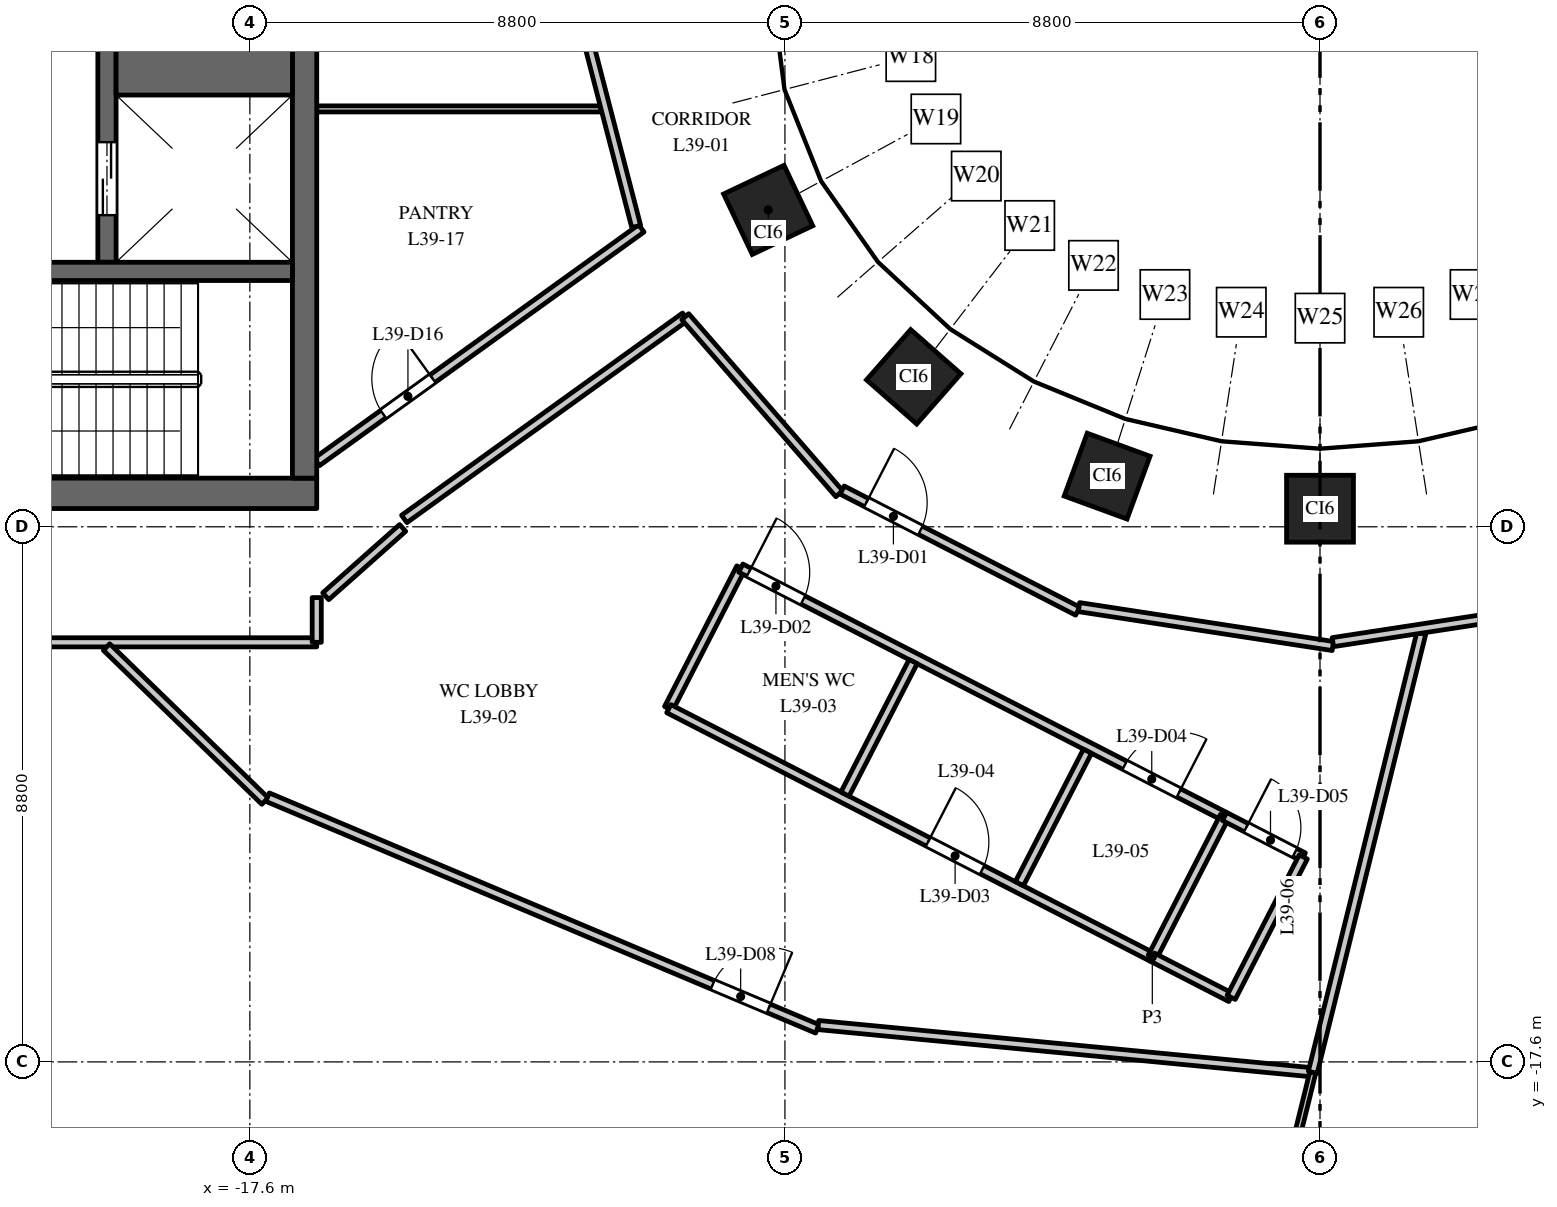
"""IFC4 building model, lengths in metres.
Left out: names, types, materials, properties, quantities, classifications, styles, units other than length and angle.
Written with IfcOpenShell. Run it as: python <this file> out.ifc"""

import sys

from ifc_helpers import new_model, si_unit, direction, frame, frame_2d, origin, origin_2d, place, context, subcontext, project, spatial, rectangle, extrude, element, fill, save


model = new_model("IFC4")
c1 = context("Model", 3, precision=1e-05, world=origin(), true_north=direction((0.0, 1.0)))
c2 = subcontext(c1, "Body", "Model", "MODEL_VIEW")
j1 = project(units=[si_unit("LENGTHUNIT", "METRE"), si_unit("PLANEANGLEUNIT", "RADIAN")], contexts=[c1])
p1 = place(None, origin())
s1 = spatial("IfcSite", under=j1, at=p1, CompositionType="ELEMENT")
p2 = place(p1, origin())
s2 = spatial("IfcBuilding", under=s1, at=p2, CompositionType="ELEMENT")
p3 = place(p2, frame((0.0, 0.0, 170.0)))
s3 = spatial("IfcBuildingStorey", under=s2, at=p3, CompositionType="ELEMENT", Elevation=170.0)
for number, where, z_axis, x_axis in (
    (1, (-9.076, -3.588, 0.0), (0.0, 0.0, 1.0), (0.429, -0.903, 0.0)),
    (2, (-6.682, -6.334, 0.0), (0.0, 0.0, 1.0), (0.751, -0.66, 0.0)),
    (3, (-3.501, -7.967, 0.0), (0.0, 0.0, 1.0), (0.939, -0.344, 0.0)),
    (4, (0.0, -8.503, 0.0), (0.0, 0.0, 1.0), (1.0, 0.0, 0.0)),
):
    element("IfcColumn", number, at=place(p3, frame(where, z_axis=z_axis, x_axis=x_axis)), inside=s3, PredefinedType="COLUMN", context=c2, shape_type="SweptSolid", body=[
        extrude(rectangle(XDim=1.1, YDim=1.1, at=origin_2d()), origin(), (0.0, 0.0, 1.0), 4.0),
    ])
p4 = place(p3, frame((-16.5, -8.25, 0.0), z_axis=(0.0, 0.0, 1.0), x_axis=(-1.0, 0.0, 0.0)))
e5 = element("IfcWall", 5, at=p4, inside=s3, PredefinedType="SHEAR", context=c2, shape_type="SweptSolid", body=[
    extrude(rectangle(XDim=15.0, YDim=0.5, at=frame_2d((7.5, 0.0))), origin(), (0.0, 0.0, 1.0), 3.7),
])
p5 = place(p4, frame((6.9, 0.0, 0.0)))
e6 = element("IfcOpeningElement", 6, at=p5, cuts=e5, PredefinedType="OPENING", context=c2, shape_type="SweptSolid", body=[
    extrude(rectangle(XDim=1.2, YDim=2.1, at=frame_2d((0.6, 1.05))), frame((0.0, 0.26, 0.0), z_axis=(0.0, -1.0, 0.0), x_axis=(1.0, 0.0, 0.0)), (0.0, 0.0, 1.0), 0.52),
])
p6 = place(p4, frame((12.05, 0.0, 0.0)))
e7 = element("IfcOpeningElement", 7, at=p6, cuts=e5, PredefinedType="OPENING", context=c2, shape_type="SweptSolid", body=[
    extrude(rectangle(XDim=0.9, YDim=2.1, at=frame_2d((0.45, 1.05))), frame((0.0, 0.26, 0.0), z_axis=(0.0, -1.0, 0.0), x_axis=(1.0, 0.0, 0.0)), (0.0, 0.0, 1.0), 0.52),
])
p7 = place(p3, frame((-19.95, -4.45, 0.0), z_axis=(0.0, 0.0, 1.0), x_axis=(0.0, 1.0, 0.0)))
e8 = element("IfcWall", 8, at=p7, inside=s3, PredefinedType="SHEAR", context=c2, shape_type="SweptSolid", body=[
    extrude(rectangle(XDim=8.9, YDim=0.3, at=frame_2d((4.45, 0.0))), origin(), (0.0, 0.0, 1.0), 3.7),
])
p8 = place(p7, frame((0.775, 0.0, 0.0)))
e9 = element("IfcOpeningElement", 9, at=p8, cuts=e8, PredefinedType="OPENING", context=c2, shape_type="SweptSolid", body=[
    extrude(rectangle(XDim=1.2, YDim=2.1, at=frame_2d((0.6, 1.05))), frame((0.0, 0.16, 0.0), z_axis=(0.0, -1.0, 0.0), x_axis=(1.0, 0.0, 0.0)), (0.0, 0.0, 1.0), 0.32),
])
p9 = place(p7, frame((7.25, 0.0, 0.0)))
e10 = element("IfcOpeningElement", 10, at=p9, cuts=e8, PredefinedType="OPENING", context=c2, shape_type="SweptSolid", body=[
    extrude(rectangle(XDim=1.1, YDim=2.1, at=frame_2d((0.55, 1.05))), frame((0.0, 0.16, 0.0), z_axis=(0.0, -1.0, 0.0), x_axis=(1.0, 0.0, 0.0)), (0.0, 0.0, 1.0), 0.32),
])
p10 = place(p3, frame((-16.7, -8.0, 0.0), z_axis=(0.0, 0.0, 1.0), x_axis=(0.0, 1.0, 0.0)))
e11 = element("IfcWall", 11, at=p10, inside=s3, PredefinedType="SHEAR", context=c2, shape_type="SweptSolid", body=[
    extrude(rectangle(XDim=16.0, YDim=0.4, at=frame_2d((8.0, 0.0))), origin(), (0.0, 0.0, 1.0), 3.7),
])
p11 = place(p3, frame((-16.9, -1.075, 0.0), z_axis=(0.0, 0.0, 1.0), x_axis=(-1.0, 0.0, 0.0)))
e12 = element("IfcWall", 12, at=p11, inside=s3, PredefinedType="SHEAR", context=c2, shape_type="SweptSolid", body=[
    extrude(rectangle(XDim=2.9, YDim=1.25, at=frame_2d((1.45, 0.0))), origin(), (0.0, 0.0, 1.0), 3.7),
])
p12 = place(p3, frame((-16.9, -4.6, 0.0), z_axis=(0.0, 0.0, 1.0), x_axis=(-1.0, 0.0, 0.0)))
e13 = element("IfcWall", 13, at=p12, inside=s3, PredefinedType="SHEAR", context=c2, shape_type="SweptSolid", body=[
    extrude(rectangle(XDim=6.18, YDim=0.3, at=frame_2d((3.09, 0.0))), origin(), (0.0, 0.0, 1.0), 3.7),
])
p13 = place(p12, frame((4.9, 0.0, 0.0)))
e14 = element("IfcOpeningElement", 14, at=p13, cuts=e13, PredefinedType="OPENING", context=c2, shape_type="SweptSolid", body=[
    extrude(rectangle(XDim=1.1, YDim=2.1, at=frame_2d((0.55, 1.05))), frame((0.0, 0.16, 0.0), z_axis=(0.0, -1.0, 0.0), x_axis=(1.0, 0.0, 0.0)), (0.0, 0.0, 1.0), 0.32),
])
p14 = place(p3, frame((-31.5, -10.7, 0.0), z_axis=(0.0, 0.0, 1.0), x_axis=(1.0, 0.0, 0.0)))
e15 = element("IfcWall", 15, at=p14, inside=s3, PredefinedType="PARTITIONING", context=c2, shape_type="SweptSolid", body=[
    extrude(rectangle(XDim=15.0, YDim=0.15, at=frame_2d((7.5, 0.0))), origin(), (0.0, 0.0, 1.0), 3.1),
])
p15 = place(p14, frame((5.15, 0.0, 0.0)))
e16 = element("IfcOpeningElement", 16, at=p15, cuts=e15, PredefinedType="OPENING", context=c2, shape_type="SweptSolid", body=[
    extrude(rectangle(XDim=1.0, YDim=2.1, at=frame_2d((0.5, 1.05))), frame((0.0, 0.085, 0.0), z_axis=(0.0, -1.0, 0.0), x_axis=(1.0, 0.0, 0.0)), (0.0, 0.0, 1.0), 0.17),
])
p16 = place(p3, frame((-19.957, -10.778, 0.0), z_axis=(0.0, 0.0, 1.0), x_axis=(0.717213172792, -0.696853833148, 0.0)))
e17 = element("IfcWall", 17, at=p16, inside=s3, PredefinedType="PARTITIONING", context=c2, shape_type="SweptSolid", body=[
    extrude(rectangle(XDim=3.634, YDim=0.15, at=frame_2d((1.817, 0.0))), origin(), (0.0, 0.0, 1.0), 2.75),
])
p17 = place(p3, frame((-17.309, -13.246, 0.0), z_axis=(0.0, 0.0, 1.0), x_axis=(0.92150277738, -0.388371769417, 0.0)))
e18 = element("IfcWall", 18, at=p17, inside=s3, PredefinedType="PARTITIONING", context=c2, shape_type="SweptSolid", body=[
    extrude(rectangle(XDim=9.812, YDim=0.15, at=frame_2d((4.906, 0.0))), origin(), (0.0, 0.0, 1.0), 2.85),
])
p18 = place(p17, frame((7.944, 0.0, 0.0)))
e19 = element("IfcOpeningElement", 19, at=p18, cuts=e18, PredefinedType="OPENING", context=c2, shape_type="SweptSolid", body=[
    extrude(rectangle(XDim=1.0, YDim=2.1, at=frame_2d((0.5, 1.05))), frame((0.0, 0.085, 0.0), z_axis=(0.0, -1.0, 0.0), x_axis=(1.0, 0.0, 0.0)), (0.0, 0.0, 1.0), 0.17),
])
p19 = place(p3, frame((-16.5, -10.7, 0.0), z_axis=(0.0, 0.0, 1.0), x_axis=(0.0, 1.0, 0.0)))
e20 = element("IfcWall", 20, at=p19, inside=s3, PredefinedType="PARTITIONING", context=c2, shape_type="SweptSolid", body=[
    extrude(rectangle(XDim=0.736, YDim=0.15, at=frame_2d((0.368, 0.0))), origin(), (0.0, 0.0, 1.0), 3.7),
])
p20 = place(p3, frame((-16.5, -1.928, 0.0), z_axis=(0.0, 0.0, 1.0), x_axis=(1.0, 0.0, 0.0)))
e21 = element("IfcWall", 21, at=p20, inside=s3, PredefinedType="PARTITIONING", context=c2, shape_type="SweptSolid", body=[
    extrude(rectangle(XDim=4.672, YDim=0.1, at=frame_2d((2.336, 0.0))), origin(), (0.0, 0.0, 1.0), 3.7),
])
p21 = place(p3, frame((-16.5, -7.735, 0.0), z_axis=(0.0, 0.0, 1.0), x_axis=(0.811616692984, 0.584190331715, 0.0)))
e22 = element("IfcWall", 22, at=p21, inside=s3, PredefinedType="PARTITIONING", context=c2, shape_type="SweptSolid", body=[
    extrude(rectangle(XDim=6.578, YDim=0.15, at=frame_2d((3.289, 0.0))), origin(), (0.0, 0.0, 1.0), 3.7),
])
p22 = place(p21, frame((1.348, 0.0, 0.0)))
e23 = element("IfcOpeningElement", 23, at=p22, cuts=e22, PredefinedType="OPENING", context=c2, shape_type="SweptSolid", body=[
    extrude(rectangle(XDim=1.0, YDim=2.1, at=frame_2d((0.5, 1.05))), frame((0.0, 0.085, 0.0), z_axis=(0.0, -1.0, 0.0), x_axis=(1.0, 0.0, 0.0)), (0.0, 0.0, 1.0), 0.17),
])
p23 = place(p3, frame((-15.061, -8.671, 0.0), z_axis=(0.0, 0.0, 1.0), x_axis=(0.811697765448, 0.584077681106, 0.0)))
e24 = element("IfcWall", 24, at=p23, inside=s3, PredefinedType="PARTITIONING", context=c2, shape_type="SweptSolid", body=[
    extrude(rectangle(XDim=5.694, YDim=0.15, at=frame_2d((2.847, 0.0))), origin(), (0.0, 0.0, 1.0), 3.7),
])
p24 = place(p3, frame((-12.286, 0.149, 0.0), z_axis=(0.0, 0.0, 1.0), x_axis=(0.250998973278, -0.96798735292, 0.0)))
e25 = element("IfcWall", 25, at=p24, inside=s3, PredefinedType="PARTITIONING", context=c2, shape_type="SweptSolid", body=[
    extrude(rectangle(XDim=4.143, YDim=0.15, at=frame_2d((2.071, 0.0))), origin(), (0.0, 0.0, 1.0), 3.7),
])
p25 = place(p3, frame((-10.713, -11.789, 0.0), z_axis=(0.0, 0.0, 1.0), x_axis=(0.457029651421, 0.88945145889, 0.0)))
e26 = element("IfcWall", 26, at=p25, inside=s3, PredefinedType="PARTITIONING", context=c2, shape_type="SweptSolid", body=[
    extrude(rectangle(XDim=2.599, YDim=0.15, at=frame_2d((1.3, 0.0))), origin(), (0.0, 0.0, 1.0), 3.7),
])
p26 = place(p3, frame((-10.71, -11.791, 0.0), z_axis=(0.0, 0.0, 1.0), x_axis=(0.889407716884, -0.457114770214, 0.0)))
e27 = element("IfcWall", 27, at=p26, inside=s3, PredefinedType="PARTITIONING", context=c2, shape_type="SweptSolid", body=[
    extrude(rectangle(XDim=8.941, YDim=0.15, at=frame_2d((4.47, 0.0))), origin(), (0.0, 0.0, 1.0), 2.85),
])
p27 = place(p26, frame((4.794, 0.0, 0.0)))
e28 = element("IfcOpeningElement", 28, at=p27, cuts=e27, PredefinedType="OPENING", context=c2, shape_type="SweptSolid", body=[
    extrude(rectangle(XDim=1.0, YDim=2.1, at=frame_2d((0.5, 1.05))), frame((0.0, 0.085, 0.0), z_axis=(0.0, -1.0, 0.0), x_axis=(1.0, 0.0, 0.0)), (0.0, 0.0, 1.0), 0.17),
])
p28 = place(p3, frame((-10.439, -5.345, 0.0), z_axis=(0.0, 0.0, 1.0), x_axis=(0.656405809938, -0.754407988213, 0.0)))
e29 = element("IfcWall", 29, at=p28, inside=s3, PredefinedType="PARTITIONING", context=c2, shape_type="SweptSolid", body=[
    extrude(rectangle(XDim=3.859, YDim=0.15, at=frame_2d((1.929, 0.0))), origin(), (0.0, 0.0, 1.0), 2.75),
])
p29 = place(p3, frame((-9.526, -9.479, 0.0), z_axis=(0.0, 0.0, 1.0), x_axis=(0.889587704396, -0.456764398992, 0.0)))
e30 = element("IfcWall", 30, at=p29, inside=s3, PredefinedType="PARTITIONING", context=c2, shape_type="SweptSolid", body=[
    extrude(rectangle(XDim=8.943, YDim=0.15, at=frame_2d((4.472, 0.0))), origin(), (0.0, 0.0, 1.0), 2.85),
])
p30 = place(p29, frame((0.15, 0.0, 0.0)))
e31 = element("IfcOpeningElement", 31, at=p30, cuts=e30, PredefinedType="OPENING", context=c2, shape_type="SweptSolid", body=[
    extrude(rectangle(XDim=1.0, YDim=2.1, at=frame_2d((0.5, 1.05))), frame((0.0, 0.085, 0.0), z_axis=(0.0, -1.0, 0.0), x_axis=(1.0, 0.0, 0.0)), (0.0, 0.0, 1.0), 0.17),
])
p31 = place(p29, frame((7.098, 0.0, 0.0)))
e32 = element("IfcOpeningElement", 32, at=p31, cuts=e30, PredefinedType="OPENING", context=c2, shape_type="SweptSolid", body=[
    extrude(rectangle(XDim=1.0, YDim=2.1, at=frame_2d((0.5, 1.05))), frame((0.0, 0.085, 0.0), z_axis=(0.0, -1.0, 0.0), x_axis=(1.0, 0.0, 0.0)), (0.0, 0.0, 1.0), 0.17),
])
p32 = place(p3, frame((-8.251, -16.994, 0.0), z_axis=(0.0, 0.0, 1.0), x_axis=(0.995454957633, -0.095233540959, 0.0)))
e33 = element("IfcWall", 33, at=p32, inside=s3, PredefinedType="PARTITIONING", context=c2, shape_type="SweptSolid", body=[
    extrude(rectangle(XDim=8.17, YDim=0.15, at=frame_2d((4.085, 0.0))), origin(), (0.0, 0.0, 1.0), 2.85),
])
p33 = place(p3, frame((-7.859, -8.196, 0.0), z_axis=(0.0, 0.0, 1.0), x_axis=(0.889405670308, -0.457118752213, 0.0)))
e34 = element("IfcWall", 34, at=p33, inside=s3, PredefinedType="PARTITIONING", context=c2, shape_type="SweptSolid", body=[
    extrude(rectangle(XDim=4.355, YDim=0.15, at=frame_2d((2.178, 0.0))), origin(), (0.0, 0.0, 1.0), 2.85),
])
p34 = place(p33, frame((0.448, 0.0, 0.0)))
e35 = element("IfcOpeningElement", 35, at=p34, cuts=e34, PredefinedType="OPENING", context=c2, shape_type="SweptSolid", body=[
    extrude(rectangle(XDim=1.0, YDim=2.1, at=frame_2d((0.5, 1.05))), frame((0.0, 0.085, 0.0), z_axis=(0.0, -1.0, 0.0), x_axis=(1.0, 0.0, 0.0)), (0.0, 0.0, 1.0), 0.17),
])
p35 = place(p3, frame((-7.812, -13.196, 0.0), z_axis=(0.0, 0.0, 1.0), x_axis=(0.457505588377, 0.889206745703, 0.0)))
e36 = element("IfcWall", 36, at=p35, inside=s3, PredefinedType="PARTITIONING", context=c2, shape_type="SweptSolid", body=[
    extrude(rectangle(XDim=2.45, YDim=0.15, at=frame_2d((1.225, 0.0))), origin(), (0.0, 0.0, 1.0), 3.7),
])
p36 = place(p3, frame((-4.944, -14.669, 0.0), z_axis=(0.0, 0.0, 1.0), x_axis=(0.457352517402, 0.889285485559, 0.0)))
e37 = element("IfcWall", 37, at=p36, inside=s3, PredefinedType="PARTITIONING", context=c2, shape_type="SweptSolid", body=[
    extrude(rectangle(XDim=2.449, YDim=0.15, at=frame_2d((1.225, 0.0))), origin(), (0.0, 0.0, 1.0), 3.7),
])
p37 = place(p3, frame((-3.964, -10.121, 0.0), z_axis=(0.0, 0.0, 1.0), x_axis=(0.988463044045, -0.151462241359, 0.0)))
e38 = element("IfcWall", 38, at=p37, inside=s3, PredefinedType="PARTITIONING", context=c2, shape_type="SweptSolid", body=[
    extrude(rectangle(XDim=4.225, YDim=0.15, at=frame_2d((2.112, 0.0))), origin(), (0.0, 0.0, 1.0), 2.85),
])
p38 = place(p3, frame((-2.758, -15.877, 0.0), z_axis=(0.0, 0.0, 1.0), x_axis=(0.45687697466, 0.88952989271, 0.0)))
e39 = element("IfcWall", 39, at=p38, inside=s3, PredefinedType="PARTITIONING", context=c2, shape_type="SweptSolid", body=[
    extrude(rectangle(XDim=2.6, YDim=0.15, at=frame_2d((1.3, 0.0))), origin(), (0.0, 0.0, 1.0), 3.7),
])
p39 = place(p3, frame((-2.758, -15.877, 0.0), z_axis=(0.0, 0.0, 1.0), x_axis=(0.889397143567, -0.45713534212, 0.0)))
e40 = element("IfcWall", 40, at=p39, inside=s3, PredefinedType="PARTITIONING", context=c2, shape_type="SweptSolid", body=[
    extrude(rectangle(XDim=1.453, YDim=0.15, at=frame_2d((0.726, 0.0))), origin(), (0.0, 0.0, 1.0), 3.7),
])
p40 = place(p3, frame((-2.609, -27.858, 0.0), z_axis=(0.0, 0.0, 1.0), x_axis=(0.23976994075, 0.970829735594, 0.0)))
e41 = element("IfcWall", 41, at=p40, inside=s3, PredefinedType="PARTITIONING", context=c2, shape_type="SweptSolid", body=[
    extrude(rectangle(XDim=10.389, YDim=0.1, at=frame_2d((5.194, 0.0))), origin(), (0.0, 0.0, 1.0), 2.85),
])
p41 = place(p3, frame((-1.57, -13.564, 0.0), z_axis=(0.0, 0.0, 1.0), x_axis=(0.889307281448, -0.457310134551, 0.0)))
e42 = element("IfcWall", 42, at=p41, inside=s3, PredefinedType="PARTITIONING", context=c2, shape_type="SweptSolid", body=[
    extrude(rectangle(XDim=1.456, YDim=0.15, at=frame_2d((0.728, 0.0))), origin(), (0.0, 0.0, 1.0), 2.85),
])
p42 = place(p41, frame((0.4, 0.0, 0.0)))
e43 = element("IfcOpeningElement", 43, at=p42, cuts=e42, PredefinedType="OPENING", context=c2, shape_type="SweptSolid", body=[
    extrude(rectangle(XDim=0.9, YDim=2.1, at=frame_2d((0.45, 1.05))), frame((0.0, 0.085, 0.0), z_axis=(0.0, -1.0, 0.0), x_axis=(1.0, 0.0, 0.0)), (0.0, 0.0, 1.0), 0.17),
])
p43 = place(p3, frame((-1.461, -16.539, 0.0), z_axis=(0.0, 0.0, 1.0), x_axis=(0.456893187255, 0.889521565472, 0.0)))
e44 = element("IfcWall", 44, at=p43, inside=s3, PredefinedType="PARTITIONING", context=c2, shape_type="SweptSolid", body=[
    extrude(rectangle(XDim=2.596, YDim=0.15, at=frame_2d((1.298, 0.0))), origin(), (0.0, 0.0, 1.0), 2.85),
])
p44 = place(p3, frame((-0.119, -17.772, 0.0), z_axis=(0.0, 0.0, 1.0), x_axis=(0.239932477291, 0.970789578818, 0.0)))
e45 = element("IfcWall", 45, at=p44, inside=s3, PredefinedType="PARTITIONING", context=c2, shape_type="SweptSolid", body=[
    extrude(rectangle(XDim=7.439, YDim=0.15, at=frame_2d((3.72, 0.0))), origin(), (0.0, 0.0, 1.0), 3.7),
])
p45 = place(p3, frame((0.212, -10.697, 0.0), z_axis=(0.0, 0.0, 1.0), x_axis=(0.988454390794, 0.151518702874, 0.0)))
e46 = element("IfcWall", 46, at=p45, inside=s3, PredefinedType="PARTITIONING", context=c2, shape_type="SweptSolid", body=[
    extrude(rectangle(XDim=4.225, YDim=0.15, at=frame_2d((2.112, 0.0))), origin(), (0.0, 0.0, 1.0), 2.85),
])
p46 = place(p3, frame((-15.087, -8.819, 0.0), z_axis=(0.0, 0.0, 1.0), x_axis=(-0.747926695066, -0.663781333579, 0.0)))
e47 = element("IfcWall", 47, at=p46, inside=s3, PredefinedType="PARTITIONING", context=c2, shape_type="SweptSolid", body=[
    extrude(rectangle(XDim=1.691, YDim=0.15, at=frame_2d((0.846, 0.0))), origin(), (0.0, 0.0, 1.0), 3.7),
])
p47 = place(p8, origin())
e48 = element("IfcDoor", 48, at=p47, inside=s3, OperationType="DOUBLE_DOOR_SLIDING", PredefinedType="DOOR", context=c2, shape_type="SweptSolid", body=[
    extrude(rectangle(XDim=1.2, YDim=2.1, at=frame_2d((0.6, 1.05))), frame((0.0, 0.025, 0.0), z_axis=(0.0, -1.0, 0.0), x_axis=(1.0, 0.0, 0.0)), (0.0, 0.0, 1.0), 0.05),
])
fill(e9, e48)
p48 = place(p34, origin())
e49 = element("IfcDoor", 49, at=p48, inside=s3, OperationType="SINGLE_SWING_LEFT", PredefinedType="DOOR", context=c2, shape_type="SweptSolid", body=[
    extrude(rectangle(XDim=1.0, YDim=2.1, at=frame_2d((0.5, 1.05))), frame((0.0, 0.025, 0.0), z_axis=(0.0, -1.0, 0.0), x_axis=(1.0, 0.0, 0.0)), (0.0, 0.0, 1.0), 0.05),
])
fill(e35, e49)
p49 = place(p30, origin())
e50 = element("IfcDoor", 50, at=p49, inside=s3, OperationType="SINGLE_SWING_LEFT", PredefinedType="DOOR", context=c2, shape_type="SweptSolid", body=[
    extrude(rectangle(XDim=1.0, YDim=2.1, at=frame_2d((0.5, 1.05))), frame((0.0, 0.025, 0.0), z_axis=(0.0, -1.0, 0.0), x_axis=(1.0, 0.0, 0.0)), (0.0, 0.0, 1.0), 0.05),
])
fill(e31, e50)
p50 = place(p27, origin())
e51 = element("IfcDoor", 51, at=p50, inside=s3, OperationType="SINGLE_SWING_LEFT", PredefinedType="DOOR", context=c2, shape_type="SweptSolid", body=[
    extrude(rectangle(XDim=1.0, YDim=2.1, at=frame_2d((0.5, 1.05))), frame((0.0, 0.025, 0.0), z_axis=(0.0, -1.0, 0.0), x_axis=(1.0, 0.0, 0.0)), (0.0, 0.0, 1.0), 0.05),
])
fill(e28, e51)
p51 = place(p31, origin())
e52 = element("IfcDoor", 52, at=p51, inside=s3, OperationType="SINGLE_SWING_RIGHT", PredefinedType="DOOR", context=c2, shape_type="SweptSolid", body=[
    extrude(rectangle(XDim=1.0, YDim=2.1, at=frame_2d((0.5, 1.05))), frame((0.0, 0.025, 0.0), z_axis=(0.0, -1.0, 0.0), x_axis=(1.0, 0.0, 0.0)), (0.0, 0.0, 1.0), 0.05),
])
fill(e32, e52)
p52 = place(p42, origin())
e53 = element("IfcDoor", 53, at=p52, inside=s3, OperationType="SINGLE_SWING_LEFT", PredefinedType="DOOR", context=c2, shape_type="SweptSolid", body=[
    extrude(rectangle(XDim=0.9, YDim=2.1, at=frame_2d((0.45, 1.05))), frame((0.0, 0.025, 0.0), z_axis=(0.0, -1.0, 0.0), x_axis=(1.0, 0.0, 0.0)), (0.0, 0.0, 1.0), 0.05),
])
fill(e43, e53)
p53 = place(p18, origin())
e54 = element("IfcDoor", 54, at=p53, inside=s3, OperationType="SINGLE_SWING_RIGHT", PredefinedType="DOOR", context=c2, shape_type="SweptSolid", body=[
    extrude(rectangle(XDim=1.0, YDim=2.1, at=frame_2d((0.5, 1.05))), frame((0.0, 0.025, 0.0), z_axis=(0.0, -1.0, 0.0), x_axis=(1.0, 0.0, 0.0)), (0.0, 0.0, 1.0), 0.05),
])
fill(e19, e54)
p54 = place(p22, origin())
e55 = element("IfcDoor", 55, at=p54, inside=s3, OperationType="SINGLE_SWING_RIGHT", PredefinedType="DOOR", context=c2, shape_type="SweptSolid", body=[
    extrude(rectangle(XDim=1.0, YDim=2.1, at=frame_2d((0.5, 1.05))), frame((0.0, 0.025, 0.0), z_axis=(0.0, -1.0, 0.0), x_axis=(1.0, 0.0, 0.0)), (0.0, 0.0, 1.0), 0.05),
])
fill(e23, e55)
save(model, sys.argv[1])
